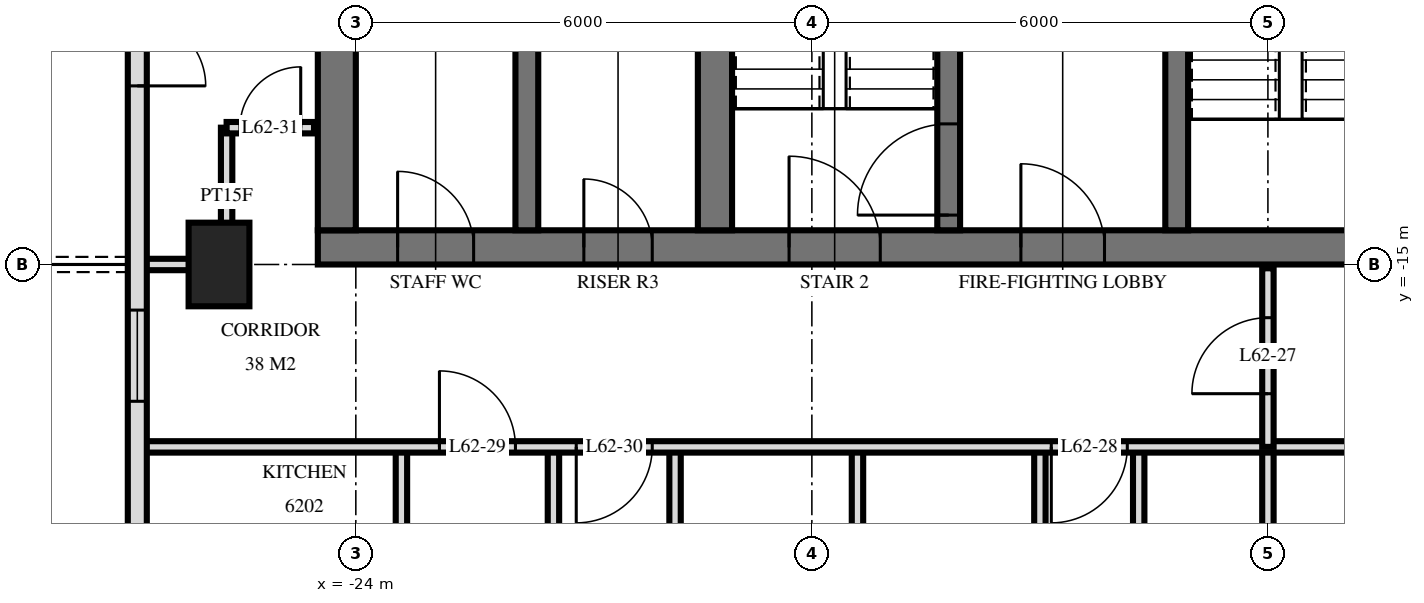
"""IFC4 building model, lengths in metres.
Left out: names, types, materials, properties, quantities, classifications, styles, units other than length and angle.
Written with IfcOpenShell. Run it as: python <this file> out.ifc"""

import sys

from ifc_helpers import new_model, si_unit, direction, frame, frame_2d, origin, origin_2d, place, context, subcontext, project, spatial, rectangle, extrude, element, fill, save


model = new_model("IFC4")
c1 = context("Model", 3, precision=1e-05, world=origin(), true_north=direction((0.0, 1.0)))
c2 = subcontext(c1, "Body", "Model", "MODEL_VIEW")
j1 = project(units=[si_unit("LENGTHUNIT", "METRE"), si_unit("PLANEANGLEUNIT", "RADIAN")], contexts=[c1])
p1 = place(None, origin())
s1 = spatial("IfcSite", under=j1, at=p1, CompositionType="ELEMENT")
p2 = place(p1, origin())
s2 = spatial("IfcBuilding", under=s1, at=p2, CompositionType="ELEMENT")
p3 = place(p2, frame((0.0, 0.0, 236.1)))
s3 = spatial("IfcBuildingStorey", under=s2, at=p3, CompositionType="ELEMENT", Elevation=236.1)
p4 = place(p3, frame((-25.8, -15.0, 0.0), z_axis=(0.0, 0.0, 1.0), x_axis=(0.0, 1.0, 0.0)))
e1 = element("IfcColumn", 1, at=p4, inside=s3, PredefinedType="COLUMN", context=c2, shape_type="SweptSolid", body=[
    extrude(rectangle(XDim=1.1, YDim=0.8, at=origin_2d()), origin(), (0.0, 0.0, 1.0), 3.5),
])
p5 = place(p3, frame((-24.5, -14.775, 0.0), z_axis=(0.0, 0.0, 1.0), x_axis=(1.0, 0.0, 0.0)))
e2 = element("IfcWall", 2, at=p5, inside=s3, PredefinedType="SHEAR", context=c2, shape_type="SweptSolid", body=[
    extrude(rectangle(XDim=14.5, YDim=0.45, at=frame_2d((7.25, 0.0))), origin(), (0.0, 0.0, 1.0), 3.5),
])
p6 = place(p5, frame((6.2, 0.0, 0.0)))
e3 = element("IfcOpeningElement", 3, at=p6, cuts=e2, PredefinedType="OPENING", context=c2, shape_type="SweptSolid", body=[
    extrude(rectangle(XDim=1.2, YDim=2.1, at=frame_2d((0.6, 1.05))), frame((0.0, 0.235, 0.0), z_axis=(0.0, -1.0, 0.0), x_axis=(1.0, 0.0, 0.0)), (0.0, 0.0, 1.0), 0.47),
])
p7 = place(p5, frame((9.25, 0.0, 0.0)))
e4 = element("IfcOpeningElement", 4, at=p7, cuts=e2, PredefinedType="OPENING", context=c2, shape_type="SweptSolid", body=[
    extrude(rectangle(XDim=1.1, YDim=2.1, at=frame_2d((0.55, 1.05))), frame((0.0, 0.235, 0.0), z_axis=(0.0, -1.0, 0.0), x_axis=(1.0, 0.0, 0.0)), (0.0, 0.0, 1.0), 0.47),
])
p8 = place(p5, frame((3.5, 0.0, 0.0)))
e5 = element("IfcOpeningElement", 5, at=p8, cuts=e2, PredefinedType="OPENING", context=c2, shape_type="SweptSolid", body=[
    extrude(rectangle(XDim=0.9, YDim=2.1, at=frame_2d((0.45, 1.05))), frame((0.0, 0.235, 0.0), z_axis=(0.0, -1.0, 0.0), x_axis=(1.0, 0.0, 0.0)), (0.0, 0.0, 1.0), 0.47),
])
p9 = place(p5, frame((1.05, 0.0, 0.0)))
e6 = element("IfcOpeningElement", 6, at=p9, cuts=e2, PredefinedType="OPENING", context=c2, shape_type="SweptSolid", body=[
    extrude(rectangle(XDim=1.0, YDim=2.1, at=frame_2d((0.5, 1.05))), frame((0.0, 0.235, 0.0), z_axis=(0.0, -1.0, 0.0), x_axis=(1.0, 0.0, 0.0)), (0.0, 0.0, 1.0), 0.47),
])
p10 = place(p3, frame((-24.25, -14.55, 0.0), z_axis=(0.0, 0.0, 1.0), x_axis=(0.0, 1.0, 0.0)))
e7 = element("IfcWall", 7, at=p10, inside=s3, PredefinedType="SHEAR", context=c2, shape_type="SweptSolid", body=[
    extrude(rectangle(XDim=14.1, YDim=0.5, at=frame_2d((7.05, 0.0))), origin(), (0.0, 0.0, 1.0), 3.5),
])
p11 = place(p3, frame((-13.2, -14.55, 0.0), z_axis=(0.0, 0.0, 1.0), x_axis=(0.0, 1.0, 0.0)))
e8 = element("IfcWall", 8, at=p11, inside=s3, PredefinedType="SHEAR", context=c2, shape_type="SweptSolid", body=[
    extrude(rectangle(XDim=5.4, YDim=0.3, at=frame_2d((2.7, 0.0))), origin(), (0.0, 0.0, 1.0), 3.5),
])
p12 = place(p11, frame((4.0, 0.0, 0.0)))
e9 = element("IfcOpeningElement", 9, at=p12, cuts=e8, PredefinedType="OPENING", context=c2, shape_type="SweptSolid", body=[
    extrude(rectangle(XDim=1.2, YDim=2.1, at=frame_2d((0.6, 1.05))), frame((0.0, 0.16, 0.0), z_axis=(0.0, -1.0, 0.0), x_axis=(1.0, 0.0, 0.0)), (0.0, 0.0, 1.0), 0.32),
])
p13 = place(p3, frame((-16.2, -14.55, 0.0), z_axis=(0.0, 0.0, 1.0), x_axis=(0.0, 1.0, 0.0)))
e10 = element("IfcWall", 10, at=p13, inside=s3, PredefinedType="SHEAR", context=c2, shape_type="SweptSolid", body=[
    extrude(rectangle(XDim=5.4, YDim=0.3, at=frame_2d((2.7, 0.0))), origin(), (0.0, 0.0, 1.0), 3.5),
])
p14 = place(p13, frame((0.2, 0.0, 0.0)))
e11 = element("IfcOpeningElement", 11, at=p14, cuts=e10, PredefinedType="OPENING", context=c2, shape_type="SweptSolid", body=[
    extrude(rectangle(XDim=1.2, YDim=2.1, at=frame_2d((0.6, 1.05))), frame((0.0, 0.16, 0.0), z_axis=(0.0, -1.0, 0.0), x_axis=(1.0, 0.0, 0.0)), (0.0, 0.0, 1.0), 0.32),
])
p15 = place(p3, frame((-19.275, -14.55, 0.0), z_axis=(0.0, 0.0, 1.0), x_axis=(0.0, 1.0, 0.0)))
e12 = element("IfcWall", 12, at=p15, inside=s3, PredefinedType="SHEAR", context=c2, shape_type="SweptSolid", body=[
    extrude(rectangle(XDim=5.4, YDim=0.45, at=frame_2d((2.7, 0.0))), origin(), (0.0, 0.0, 1.0), 3.5),
])
p16 = place(p3, frame((-21.75, -14.55, 0.0), z_axis=(0.0, 0.0, 1.0), x_axis=(0.0, 1.0, 0.0)))
e13 = element("IfcWall", 13, at=p16, inside=s3, PredefinedType="SHEAR", context=c2, shape_type="SweptSolid", body=[
    extrude(rectangle(XDim=5.4, YDim=0.3, at=frame_2d((2.7, 0.0))), origin(), (0.0, 0.0, 1.0), 3.5),
])
p17 = place(p3, frame((-26.875, -3.325, 0.0), z_axis=(0.0, 0.0, 1.0), x_axis=(0.0, -1.0, 0.0)))
e14 = element("IfcWall", 14, at=p17, inside=s3, PredefinedType="SOLIDWALL", context=c2, shape_type="SweptSolid", body=[
    extrude(rectangle(XDim=21.551, YDim=0.25, at=frame_2d((10.775, 0.0))), origin(), (0.0, 0.0, 1.0), 3.22),
])
p18 = place(p17, frame((7.525, 0.0, 0.0)))
e15 = element("IfcOpeningElement", 15, at=p18, cuts=e14, PredefinedType="OPENING", context=c2, shape_type="SweptSolid", body=[
    extrude(rectangle(XDim=1.8, YDim=2.4, at=frame_2d((0.9, 1.2))), frame((0.0, 0.135, 0.0), z_axis=(0.0, -1.0, 0.0), x_axis=(1.0, 0.0, 0.0)), (0.0, 0.0, 1.0), 0.27),
])
p19 = place(p17, frame((12.275, 0.0, 0.9)))
e16 = element("IfcOpeningElement", 16, at=p19, cuts=e14, PredefinedType="OPENING", context=c2, shape_type="SweptSolid", body=[
    extrude(rectangle(XDim=1.2, YDim=1.5, at=frame_2d((0.6, 0.75))), frame((0.0, 0.135, 0.0), z_axis=(0.0, -1.0, 0.0), x_axis=(1.0, 0.0, 0.0)), (0.0, 0.0, 1.0), 0.27),
])
p20 = place(p17, frame((15.275, 0.0, 0.0)))
e17 = element("IfcOpeningElement", 17, at=p20, cuts=e14, PredefinedType="OPENING", context=c2, shape_type="SweptSolid", body=[
    extrude(rectangle(XDim=1.8, YDim=2.4, at=frame_2d((0.9, 1.2))), frame((0.0, 0.135, 0.0), z_axis=(0.0, -1.0, 0.0), x_axis=(1.0, 0.0, 0.0)), (0.0, 0.0, 1.0), 0.27),
])
p21 = place(p17, frame((18.875, 0.0, 0.0)))
e18 = element("IfcOpeningElement", 18, at=p21, cuts=e14, PredefinedType="OPENING", context=c2, shape_type="SweptSolid", body=[
    extrude(rectangle(XDim=1.8, YDim=2.4, at=frame_2d((0.9, 1.2))), frame((0.0, 0.135, 0.0), z_axis=(0.0, -1.0, 0.0), x_axis=(1.0, 0.0, 0.0)), (0.0, 0.0, 1.0), 0.27),
])
p22 = place(p3, frame((-12.0, -17.4, 0.0), z_axis=(0.0, 0.0, 1.0), x_axis=(0.0, 1.0, 0.0)))
e19 = element("IfcWall", 19, at=p22, inside=s3, PredefinedType="PARTITIONING", context=c2, shape_type="SweptSolid", body=[
    extrude(rectangle(XDim=2.35, YDim=0.15, at=frame_2d((1.175, 0.0))), origin(), (0.0, 0.0, 1.0), 3.22),
])
p23 = place(p22, frame((0.7, 0.0, 0.0)))
e20 = element("IfcOpeningElement", 20, at=p23, cuts=e19, PredefinedType="OPENING", context=c2, shape_type="SweptSolid", body=[
    extrude(rectangle(XDim=1.0, YDim=2.1, at=frame_2d((0.5, 1.05))), frame((0.0, 0.085, 0.0), z_axis=(0.0, -1.0, 0.0), x_axis=(1.0, 0.0, 0.0)), (0.0, 0.0, 1.0), 0.17),
])
p24 = place(p3, frame((-12.0, -29.22, 0.0), z_axis=(0.0, 0.0, 1.0), x_axis=(0.0, 1.0, 0.0)))
e21 = element("IfcWall", 21, at=p24, inside=s3, PredefinedType="PARTITIONING", context=c2, shape_type="SweptSolid", body=[
    extrude(rectangle(XDim=11.82, YDim=0.15, at=frame_2d((5.91, 0.0))), origin(), (0.0, 0.0, 1.0), 3.22),
])
p25 = place(p3, frame((-13.7, -21.6, 0.0), z_axis=(0.0, 0.0, 1.0), x_axis=(0.0, 1.0, 0.0)))
e22 = element("IfcWall", 22, at=p25, inside=s3, PredefinedType="PARTITIONING", context=c2, shape_type="SweptSolid", body=[
    extrude(rectangle(XDim=4.2, YDim=0.15, at=frame_2d((2.1, 0.0))), origin(), (0.0, 0.0, 1.0), 3.22),
])
p26 = place(p25, frame((1.72, 0.0, 0.0)))
e23 = element("IfcOpeningElement", 23, at=p26, cuts=e22, PredefinedType="OPENING", context=c2, shape_type="SweptSolid", body=[
    extrude(rectangle(XDim=0.8, YDim=2.1, at=frame_2d((0.4, 1.05))), frame((0.0, 0.085, 0.0), z_axis=(0.0, -1.0, 0.0), x_axis=(1.0, 0.0, 0.0)), (0.0, 0.0, 1.0), 0.17),
])
p27 = place(p3, frame((-15.0, -29.22, 0.0), z_axis=(0.0, 0.0, 1.0), x_axis=(0.0, 1.0, 0.0)))
e24 = element("IfcWall", 24, at=p27, inside=s3, PredefinedType="PARTITIONING", context=c2, shape_type="SweptSolid", body=[
    extrude(rectangle(XDim=11.82, YDim=0.15, at=frame_2d((5.91, 0.0))), origin(), (0.0, 0.0, 1.0), 3.22),
])
for number, where, z_axis, x_axis in (
    (25, (-17.4, -21.6, 0.0), (0.0, 0.0, 1.0), (0.0, 1.0, 0.0)),
    (26, (-19.8, -21.6, 0.0), (0.0, 0.0, 1.0), (0.0, 1.0, 0.0)),
    (27, (-21.4, -21.6, 0.0), (0.0, 0.0, 1.0), (0.0, 1.0, 0.0)),
):
    element("IfcWall", number, at=place(p3, frame(where, z_axis=z_axis, x_axis=x_axis)), inside=s3, PredefinedType="PARTITIONING", context=c2, shape_type="SweptSolid", body=[
        extrude(rectangle(XDim=4.2, YDim=0.15, at=frame_2d((2.1, 0.0))), origin(), (0.0, 0.0, 1.0), 3.22),
    ])
p28 = place(p3, frame((-23.4, -21.6, 0.0), z_axis=(0.0, 0.0, 1.0), x_axis=(0.0, 1.0, 0.0)))
e28 = element("IfcWall", 28, at=p28, inside=s3, PredefinedType="PARTITIONING", context=c2, shape_type="SweptSolid", body=[
    extrude(rectangle(XDim=4.2, YDim=0.15, at=frame_2d((2.1, 0.0))), origin(), (0.0, 0.0, 1.0), 3.22),
])
p29 = place(p28, frame((1.58, 0.0, 0.0)))
e29 = element("IfcOpeningElement", 29, at=p29, cuts=e28, PredefinedType="OPENING", context=c2, shape_type="SweptSolid", body=[
    extrude(rectangle(XDim=1.0, YDim=2.1, at=frame_2d((0.5, 1.05))), frame((0.0, 0.085, 0.0), z_axis=(0.0, -1.0, 0.0), x_axis=(1.0, 0.0, 0.0)), (0.0, 0.0, 1.0), 0.17),
])
p30 = place(p3, frame((-25.7, -15.0, 0.0), z_axis=(0.0, 0.0, 1.0), x_axis=(0.0, 1.0, 0.0)))
e30 = element("IfcWall", 30, at=p30, inside=s3, PredefinedType="PARTITIONING", context=c2, shape_type="SweptSolid", body=[
    extrude(rectangle(XDim=1.8, YDim=0.15, at=frame_2d((0.9, 0.0))), origin(), (0.0, 0.0, 1.0), 3.22),
])
p31 = place(p3, frame((-26.82, -17.4, 0.0), z_axis=(0.0, 0.0, 1.0), x_axis=(1.0, 0.0, 0.0)))
e31 = element("IfcWall", 31, at=p31, inside=s3, PredefinedType="PARTITIONING", context=c2, shape_type="SweptSolid", body=[
    extrude(rectangle(XDim=53.64, YDim=0.15, at=frame_2d((26.82, 0.0))), origin(), (0.0, 0.0, 1.0), 3.22),
])
p32 = place(p31, frame((11.97, 0.0, 0.0)))
e32 = element("IfcOpeningElement", 32, at=p32, cuts=e31, PredefinedType="OPENING", context=c2, shape_type="SweptSolid", body=[
    extrude(rectangle(XDim=1.0, YDim=2.1, at=frame_2d((0.5, 1.05))), frame((0.0, 0.085, 0.0), z_axis=(0.0, -1.0, 0.0), x_axis=(1.0, 0.0, 0.0)), (0.0, 0.0, 1.0), 0.17),
])
p33 = place(p31, frame((3.92, 0.0, 0.0)))
e33 = element("IfcOpeningElement", 33, at=p33, cuts=e31, PredefinedType="OPENING", context=c2, shape_type="SweptSolid", body=[
    extrude(rectangle(XDim=1.0, YDim=2.1, at=frame_2d((0.5, 1.05))), frame((0.0, 0.085, 0.0), z_axis=(0.0, -1.0, 0.0), x_axis=(1.0, 0.0, 0.0)), (0.0, 0.0, 1.0), 0.17),
])
p34 = place(p31, frame((5.72, 0.0, 0.0)))
e34 = element("IfcOpeningElement", 34, at=p34, cuts=e31, PredefinedType="OPENING", context=c2, shape_type="SweptSolid", body=[
    extrude(rectangle(XDim=1.0, YDim=2.1, at=frame_2d((0.5, 1.05))), frame((0.0, 0.085, 0.0), z_axis=(0.0, -1.0, 0.0), x_axis=(1.0, 0.0, 0.0)), (0.0, 0.0, 1.0), 0.17),
])
p35 = place(p31, frame((47.72, 0.0, 0.0)))
e35 = element("IfcOpeningElement", 35, at=p35, cuts=e31, PredefinedType="OPENING", context=c2, shape_type="SweptSolid", body=[
    extrude(rectangle(XDim=1.0, YDim=2.1, at=frame_2d((0.5, 1.05))), frame((0.0, 0.085, 0.0), z_axis=(0.0, -1.0, 0.0), x_axis=(1.0, 0.0, 0.0)), (0.0, 0.0, 1.0), 0.17),
])
p36 = place(p31, frame((51.02, 0.0, 0.0)))
e36 = element("IfcOpeningElement", 36, at=p36, cuts=e31, PredefinedType="OPENING", context=c2, shape_type="SweptSolid", body=[
    extrude(rectangle(XDim=1.0, YDim=2.1, at=frame_2d((0.5, 1.05))), frame((0.0, 0.085, 0.0), z_axis=(0.0, -1.0, 0.0), x_axis=(1.0, 0.0, 0.0)), (0.0, 0.0, 1.0), 0.17),
])
p37 = place(p31, frame((17.32, 0.0, 0.0)))
e37 = element("IfcOpeningElement", 37, at=p37, cuts=e31, PredefinedType="OPENING", context=c2, shape_type="SweptSolid", body=[
    extrude(rectangle(XDim=1.0, YDim=2.1, at=frame_2d((0.5, 1.05))), frame((0.0, 0.085, 0.0), z_axis=(0.0, -1.0, 0.0), x_axis=(1.0, 0.0, 0.0)), (0.0, 0.0, 1.0), 0.17),
])
p38 = place(p31, frame((23.32, 0.0, 0.0)))
e38 = element("IfcOpeningElement", 38, at=p38, cuts=e31, PredefinedType="OPENING", context=c2, shape_type="SweptSolid", body=[
    extrude(rectangle(XDim=1.0, YDim=2.1, at=frame_2d((0.5, 1.05))), frame((0.0, 0.085, 0.0), z_axis=(0.0, -1.0, 0.0), x_axis=(1.0, 0.0, 0.0)), (0.0, 0.0, 1.0), 0.17),
])
p39 = place(p31, frame((29.32, 0.0, 0.0)))
e39 = element("IfcOpeningElement", 39, at=p39, cuts=e31, PredefinedType="OPENING", context=c2, shape_type="SweptSolid", body=[
    extrude(rectangle(XDim=1.0, YDim=2.1, at=frame_2d((0.5, 1.05))), frame((0.0, 0.085, 0.0), z_axis=(0.0, -1.0, 0.0), x_axis=(1.0, 0.0, 0.0)), (0.0, 0.0, 1.0), 0.17),
])
p40 = place(p31, frame((35.32, 0.0, 0.0)))
e40 = element("IfcOpeningElement", 40, at=p40, cuts=e31, PredefinedType="OPENING", context=c2, shape_type="SweptSolid", body=[
    extrude(rectangle(XDim=1.0, YDim=2.1, at=frame_2d((0.5, 1.05))), frame((0.0, 0.085, 0.0), z_axis=(0.0, -1.0, 0.0), x_axis=(1.0, 0.0, 0.0)), (0.0, 0.0, 1.0), 0.17),
])
p41 = place(p3, frame((-26.82, -15.0, 0.0), z_axis=(0.0, 0.0, 1.0), x_axis=(1.0, 0.0, 0.0)))
e41 = element("IfcWall", 41, at=p41, inside=s3, PredefinedType="PARTITIONING", context=c2, shape_type="SweptSolid", body=[
    extrude(rectangle(XDim=1.12, YDim=0.15, at=frame_2d((0.56, 0.0))), origin(), (0.0, 0.0, 1.0), 3.22),
])
p42 = place(p3, frame((-25.7, -13.2, 0.0), z_axis=(0.0, 0.0, 1.0), x_axis=(1.0, 0.0, 0.0)))
e42 = element("IfcWall", 42, at=p42, inside=s3, PredefinedType="PARTITIONING", context=c2, shape_type="SweptSolid", body=[
    extrude(rectangle(XDim=1.15, YDim=0.15, at=frame_2d((0.575, 0.0))), origin(), (0.0, 0.0, 1.0), 3.22),
])
p43 = place(p42, frame((0.175, 0.0, 0.0)))
e43 = element("IfcOpeningElement", 43, at=p43, cuts=e42, PredefinedType="OPENING", context=c2, shape_type="SweptSolid", body=[
    extrude(rectangle(XDim=0.8, YDim=2.1, at=frame_2d((0.4, 1.05))), frame((0.0, 0.085, 0.0), z_axis=(0.0, -1.0, 0.0), x_axis=(1.0, 0.0, 0.0)), (0.0, 0.0, 1.0), 0.17),
])
p44 = place(p18, origin())
e44 = element("IfcDoor", 44, at=p44, inside=s3, OperationType="DOUBLE_DOOR_SINGLE_SWING", PredefinedType="DOOR", context=c2, shape_type="SweptSolid", body=[
    extrude(rectangle(XDim=1.8, YDim=2.4, at=frame_2d((0.9, 1.2))), frame((0.0, 0.025, 0.0), z_axis=(0.0, -1.0, 0.0), x_axis=(1.0, 0.0, 0.0)), (0.0, 0.0, 1.0), 0.05),
])
fill(e15, e44)
p45 = place(p19, origin())
e45 = element("IfcWindow", 45, at=p45, inside=s3, PartitioningType="SINGLE_PANEL", PredefinedType="WINDOW", context=c2, shape_type="SweptSolid", body=[
    extrude(rectangle(XDim=1.2, YDim=1.5, at=frame_2d((0.6, 0.75))), frame((0.0, 0.03, 0.0), z_axis=(0.0, -1.0, 0.0), x_axis=(1.0, 0.0, 0.0)), (0.0, 0.0, 1.0), 0.06),
])
fill(e16, e45)
p46 = place(p6, origin())
e46 = element("IfcDoor", 46, at=p46, inside=s3, OperationType="SINGLE_SWING_RIGHT", PredefinedType="DOOR", context=c2, shape_type="SweptSolid", body=[
    extrude(rectangle(XDim=1.2, YDim=2.1, at=frame_2d((0.6, 1.05))), frame((0.0, 0.025, 0.0), z_axis=(0.0, -1.0, 0.0), x_axis=(1.0, 0.0, 0.0)), (0.0, 0.0, 1.0), 0.05),
])
fill(e3, e46)
p47 = place(p7, origin())
e47 = element("IfcDoor", 47, at=p47, inside=s3, OperationType="SINGLE_SWING_RIGHT", PredefinedType="DOOR", context=c2, shape_type="SweptSolid", body=[
    extrude(rectangle(XDim=1.1, YDim=2.1, at=frame_2d((0.55, 1.05))), frame((0.0, 0.025, 0.0), z_axis=(0.0, -1.0, 0.0), x_axis=(1.0, 0.0, 0.0)), (0.0, 0.0, 1.0), 0.05),
])
fill(e4, e47)
p48 = place(p8, origin())
e48 = element("IfcDoor", 48, at=p48, inside=s3, OperationType="SINGLE_SWING_RIGHT", PredefinedType="DOOR", context=c2, shape_type="SweptSolid", body=[
    extrude(rectangle(XDim=0.9, YDim=2.1, at=frame_2d((0.45, 1.05))), frame((0.0, 0.025, 0.0), z_axis=(0.0, -1.0, 0.0), x_axis=(1.0, 0.0, 0.0)), (0.0, 0.0, 1.0), 0.05),
])
fill(e5, e48)
p49 = place(p9, origin())
e49 = element("IfcDoor", 49, at=p49, inside=s3, OperationType="SINGLE_SWING_RIGHT", PredefinedType="DOOR", context=c2, shape_type="SweptSolid", body=[
    extrude(rectangle(XDim=1.0, YDim=2.1, at=frame_2d((0.5, 1.05))), frame((0.0, 0.025, 0.0), z_axis=(0.0, -1.0, 0.0), x_axis=(1.0, 0.0, 0.0)), (0.0, 0.0, 1.0), 0.05),
])
fill(e6, e49)
p50 = place(p14, origin())
e50 = element("IfcDoor", 50, at=p50, inside=s3, OperationType="SINGLE_SWING_RIGHT", PredefinedType="DOOR", context=c2, shape_type="SweptSolid", body=[
    extrude(rectangle(XDim=1.2, YDim=2.1, at=frame_2d((0.6, 1.05))), frame((0.0, 0.025, 0.0), z_axis=(0.0, -1.0, 0.0), x_axis=(1.0, 0.0, 0.0)), (0.0, 0.0, 1.0), 0.05),
])
fill(e11, e50)
p51 = place(p23, origin())
e51 = element("IfcDoor", 51, at=p51, inside=s3, OperationType="SINGLE_SWING_RIGHT", PredefinedType="DOOR", context=c2, shape_type="SweptSolid", body=[
    extrude(rectangle(XDim=1.0, YDim=2.1, at=frame_2d((0.5, 1.05))), frame((0.0, 0.025, 0.0), z_axis=(0.0, -1.0, 0.0), x_axis=(1.0, 0.0, 0.0)), (0.0, 0.0, 1.0), 0.05),
])
fill(e20, e51)
p52 = place(p32, frame((0.5, 0.0, 0.0), z_axis=(0.0, 0.0, 1.0), x_axis=(-1.0, 0.0, 0.0)))
e52 = element("IfcDoor", 52, at=p52, inside=s3, OperationType="SINGLE_SWING_LEFT", PredefinedType="DOOR", context=c2, shape_type="SweptSolid", body=[
    extrude(rectangle(XDim=1.0, YDim=2.1, at=frame_2d((0.0, 1.05))), frame((0.0, -0.025, 0.0), z_axis=(0.0, 1.0, 0.0), x_axis=(-1.0, 0.0, 0.0)), (0.0, 0.0, 1.0), 0.05),
])
fill(e32, e52)
p53 = place(p33, origin())
e53 = element("IfcDoor", 53, at=p53, inside=s3, OperationType="SINGLE_SWING_RIGHT", PredefinedType="DOOR", context=c2, shape_type="SweptSolid", body=[
    extrude(rectangle(XDim=1.0, YDim=2.1, at=frame_2d((0.5, 1.05))), frame((0.0, 0.025, 0.0), z_axis=(0.0, -1.0, 0.0), x_axis=(1.0, 0.0, 0.0)), (0.0, 0.0, 1.0), 0.05),
])
fill(e33, e53)
p54 = place(p34, frame((0.5, 0.0, 0.0), z_axis=(0.0, 0.0, 1.0), x_axis=(-1.0, 0.0, 0.0)))
e54 = element("IfcDoor", 54, at=p54, inside=s3, OperationType="SINGLE_SWING_LEFT", PredefinedType="DOOR", context=c2, shape_type="SweptSolid", body=[
    extrude(rectangle(XDim=1.0, YDim=2.1, at=frame_2d((0.0, 1.05))), frame((0.0, -0.025, 0.0), z_axis=(0.0, 1.0, 0.0), x_axis=(-1.0, 0.0, 0.0)), (0.0, 0.0, 1.0), 0.05),
])
fill(e34, e54)
p55 = place(p43, origin())
e55 = element("IfcDoor", 55, at=p55, inside=s3, OperationType="SINGLE_SWING_LEFT", PredefinedType="DOOR", context=c2, shape_type="SweptSolid", body=[
    extrude(rectangle(XDim=0.8, YDim=2.1, at=frame_2d((0.4, 1.05))), frame((0.0, 0.025, 0.0), z_axis=(0.0, -1.0, 0.0), x_axis=(1.0, 0.0, 0.0)), (0.0, 0.0, 1.0), 0.05),
])
fill(e43, e55)
save(model, sys.argv[1])
